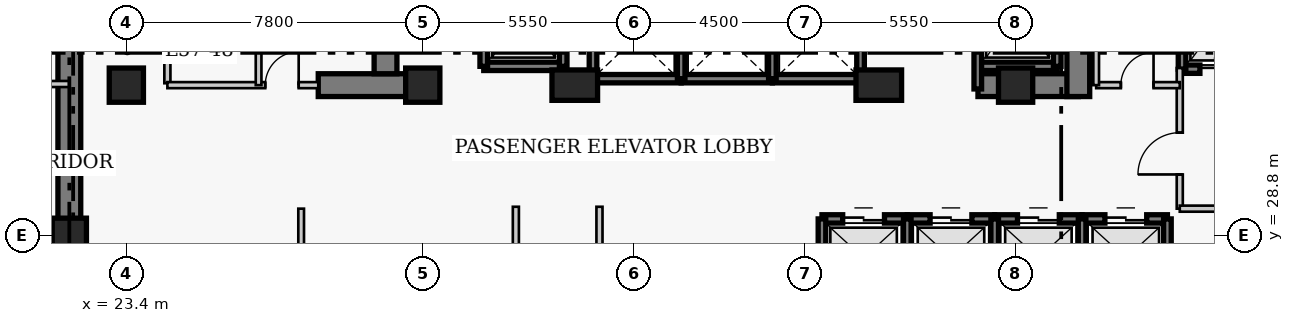
"""IFC4 building model, lengths in metres.
Left out: names, types, materials, properties, quantities, classifications, styles, units other than length and angle.
Written with IfcOpenShell. Run it as: python <this file> out.ifc"""

import sys

from ifc_helpers import new_model, si_unit, direction, frame, frame_2d, origin, origin_2d, place, context, subcontext, project, spatial, rectangle, extrude, element, fill, save


model = new_model("IFC4")
c1 = context("Model", 3, precision=1e-05, world=origin(), true_north=direction((0.0, 1.0)))
c2 = subcontext(c1, "Body", "Model", "MODEL_VIEW")
j1 = project(units=[si_unit("LENGTHUNIT", "METRE"), si_unit("PLANEANGLEUNIT", "RADIAN")], contexts=[c1])
p1 = place(None, origin())
s1 = spatial("IfcSite", under=j1, at=p1, CompositionType="ELEMENT")
p2 = place(p1, origin())
s2 = spatial("IfcBuilding", under=s1, at=p2, CompositionType="ELEMENT")
p3 = place(p2, frame((0.0, 0.0, 228.0)))
s3 = spatial("IfcBuildingStorey", under=s2, at=p3, CompositionType="ELEMENT", Elevation=228.0)
p4 = place(p3, frame((21.9, 27.05, 0.0), z_axis=(0.0, 0.0, 1.0), x_axis=(0.0, 1.0, 0.0)))
e1 = element("IfcWall", 1, at=p4, inside=s3, PredefinedType="SHEAR", context=c2, shape_type="SweptSolid", body=[
    extrude(rectangle(XDim=13.57, YDim=0.6, at=frame_2d((6.785, 0.0))), origin(), (0.0, 0.0, 1.0), 3.9),
])
p5 = place(p3, frame((28.45, 32.75, 0.0), z_axis=(0.0, 0.0, 1.0), x_axis=(1.0, 0.0, 0.0)))
e2 = element("IfcWall", 2, at=p5, inside=s3, PredefinedType="SHEAR", context=c2, shape_type="SweptSolid", body=[
    extrude(rectangle(XDim=2.4, YDim=0.6, at=frame_2d((1.2, 0.0))), origin(), (0.0, 0.0, 1.0), 3.9),
])
p6 = place(p3, frame((45.81, 32.75, 0.0), z_axis=(0.0, 0.0, 1.0), x_axis=(1.0, 0.0, 0.0)))
e3 = element("IfcWall", 3, at=p6, inside=s3, PredefinedType="SHEAR", context=c2, shape_type="SweptSolid", body=[
    extrude(rectangle(XDim=2.64, YDim=0.6, at=frame_2d((1.32, 0.0))), origin(), (0.0, 0.0, 1.0), 3.9),
])
p7 = place(p3, frame((30.22, 33.05, 0.0), z_axis=(0.0, 0.0, 1.0), x_axis=(0.0, 1.0, 0.0)))
e4 = element("IfcWall", 4, at=p7, inside=s3, PredefinedType="SHEAR", context=c2, shape_type="SweptSolid", body=[
    extrude(rectangle(XDim=7.27, YDim=0.6, at=frame_2d((3.635, 0.0))), origin(), (0.0, 0.0, 1.0), 3.9),
])
p8 = place(p3, frame((48.45, 32.45, 0.0), z_axis=(0.0, 0.0, 1.0), x_axis=(0.0, 1.0, 0.0)))
e5 = element("IfcWall", 5, at=p8, inside=s3, PredefinedType="SHEAR", context=c2, shape_type="SweptSolid", body=[
    extrude(rectangle(XDim=7.87, YDim=0.6, at=frame_2d((3.935, 0.0))), origin(), (0.0, 0.0, 1.0), 3.9),
])
p9 = place(p8, frame((5.75, 0.0, 0.0)))
e6 = element("IfcOpeningElement", 6, at=p9, cuts=e5, PredefinedType="OPENING", context=c2, shape_type="SweptSolid", body=[
    extrude(rectangle(XDim=1.1, YDim=2.15, at=frame_2d((0.55, 1.075))), frame((0.0, 0.31, 0.0), z_axis=(0.0, -1.0, 0.0), x_axis=(1.0, 0.0, 0.0)), (0.0, 0.0, 1.0), 0.62),
])
for number, where, z_axis, x_axis in (
    (7, (21.9, 28.8, 0.0), (0.0, 0.0, 1.0), (1.0, 0.0, 0.0)),
    (8, (23.4, 32.75, 0.0), (0.0, 0.0, 1.0), (1.0, 0.0, 0.0)),
    (9, (31.2, 32.75, 0.0), (0.0, 0.0, 1.0), (1.0, 0.0, 0.0)),
):
    element("IfcColumn", number, at=place(p3, frame(where, z_axis=z_axis, x_axis=x_axis)), inside=s3, PredefinedType="COLUMN", context=c2, shape_type="SweptSolid", body=[
        extrude(rectangle(XDim=0.9, YDim=0.9, at=origin_2d()), origin(), (0.0, 0.0, 1.0), 3.9),
    ])
for number, where, z_axis, x_axis in (
    (10, (35.2, 32.75, 0.0), (0.0, 0.0, 1.0), (1.0, 0.0, 0.0)),
    (11, (43.2, 32.75, 0.0), (0.0, 0.0, 1.0), (1.0, 0.0, 0.0)),
):
    element("IfcColumn", number, at=place(p3, frame(where, z_axis=z_axis, x_axis=x_axis)), inside=s3, PredefinedType="COLUMN", context=c2, shape_type="SweptSolid", body=[
        extrude(rectangle(XDim=1.2, YDim=0.8, at=origin_2d()), origin(), (0.0, 0.0, 1.0), 3.9),
    ])
p10 = place(p3, frame((46.8, 32.75, 0.0), z_axis=(0.0, 0.0, 1.0), x_axis=(1.0, 0.0, 0.0)))
e12 = element("IfcColumn", 12, at=p10, inside=s3, PredefinedType="COLUMN", context=c2, shape_type="SweptSolid", body=[
    extrude(rectangle(XDim=0.9, YDim=0.9, at=origin_2d()), origin(), (0.0, 0.0, 1.0), 3.9),
])
p11 = place(p3, frame((41.705, 29.23, 0.0), z_axis=(0.0, 0.0, 1.0), x_axis=(1.0, 0.0, 0.0)))
e13 = element("IfcWall", 13, at=p11, inside=s3, PredefinedType="SHEAR", context=c2, shape_type="SweptSolid", body=[
    extrude(rectangle(XDim=2.245, YDim=0.22, at=frame_2d((1.123, 0.0))), origin(), (0.0, 0.0, 1.0), 3.9),
])
p12 = place(p11, frame((0.545, 0.0, 0.0)))
e14 = element("IfcOpeningElement", 14, at=p12, cuts=e13, PredefinedType="OPENING", context=c2, shape_type="SweptSolid", body=[
    extrude(rectangle(XDim=1.1, YDim=2.15, at=frame_2d((0.55, 1.075))), frame((0.0, 0.12, 0.0), z_axis=(0.0, -1.0, 0.0), x_axis=(1.0, 0.0, 0.0)), (0.0, 0.0, 1.0), 0.24),
])
p13 = place(p3, frame((41.705, 27.17, 0.0), z_axis=(0.0, 0.0, 1.0), x_axis=(0.0, 1.0, 0.0)))
e15 = element("IfcWall", 15, at=p13, inside=s3, PredefinedType="SHEAR", context=c2, shape_type="SweptSolid", body=[
    extrude(rectangle(XDim=2.06, YDim=0.2, at=frame_2d((1.03, 0.0))), origin(), (0.0, 0.0, 1.0), 3.9),
])
p14 = place(p3, frame((43.95, 29.23, 0.0), z_axis=(0.0, 0.0, 1.0), x_axis=(1.0, 0.0, 0.0)))
e16 = element("IfcWall", 16, at=p14, inside=s3, PredefinedType="SHEAR", context=c2, shape_type="SweptSolid", body=[
    extrude(rectangle(XDim=2.3, YDim=0.22, at=frame_2d((1.15, 0.0))), origin(), (0.0, 0.0, 1.0), 3.9),
])
p15 = place(p14, frame((0.6, 0.0, 0.0)))
e17 = element("IfcOpeningElement", 17, at=p15, cuts=e16, PredefinedType="OPENING", context=c2, shape_type="SweptSolid", body=[
    extrude(rectangle(XDim=1.1, YDim=2.15, at=frame_2d((0.55, 1.075))), frame((0.0, 0.12, 0.0), z_axis=(0.0, -1.0, 0.0), x_axis=(1.0, 0.0, 0.0)), (0.0, 0.0, 1.0), 0.24),
])
p16 = place(p3, frame((43.95, 27.17, 0.0), z_axis=(0.0, 0.0, 1.0), x_axis=(0.0, 1.0, 0.0)))
e18 = element("IfcWall", 18, at=p16, inside=s3, PredefinedType="SHEAR", context=c2, shape_type="SweptSolid", body=[
    extrude(rectangle(XDim=2.06, YDim=0.2, at=frame_2d((1.03, 0.0))), origin(), (0.0, 0.0, 1.0), 3.9),
])
p17 = place(p3, frame((46.25, 29.23, 0.0), z_axis=(0.0, 0.0, 1.0), x_axis=(1.0, 0.0, 0.0)))
e19 = element("IfcWall", 19, at=p17, inside=s3, PredefinedType="SHEAR", context=c2, shape_type="SweptSolid", body=[
    extrude(rectangle(XDim=2.3, YDim=0.22, at=frame_2d((1.15, 0.0))), origin(), (0.0, 0.0, 1.0), 3.9),
])
p18 = place(p17, frame((0.6, 0.0, 0.0)))
e20 = element("IfcOpeningElement", 20, at=p18, cuts=e19, PredefinedType="OPENING", context=c2, shape_type="SweptSolid", body=[
    extrude(rectangle(XDim=1.1, YDim=2.15, at=frame_2d((0.55, 1.075))), frame((0.0, 0.12, 0.0), z_axis=(0.0, -1.0, 0.0), x_axis=(1.0, 0.0, 0.0)), (0.0, 0.0, 1.0), 0.24),
])
p19 = place(p3, frame((46.25, 27.17, 0.0), z_axis=(0.0, 0.0, 1.0), x_axis=(0.0, 1.0, 0.0)))
e21 = element("IfcWall", 21, at=p19, inside=s3, PredefinedType="SHEAR", context=c2, shape_type="SweptSolid", body=[
    extrude(rectangle(XDim=2.06, YDim=0.2, at=frame_2d((1.03, 0.0))), origin(), (0.0, 0.0, 1.0), 3.9),
])
p20 = place(p3, frame((48.55, 29.23, 0.0), z_axis=(0.0, 0.0, 1.0), x_axis=(1.0, 0.0, 0.0)))
e22 = element("IfcWall", 22, at=p20, inside=s3, PredefinedType="SHEAR", context=c2, shape_type="SweptSolid", body=[
    extrude(rectangle(XDim=2.245, YDim=0.22, at=frame_2d((1.123, 0.0))), origin(), (0.0, 0.0, 1.0), 3.9),
])
p21 = place(p20, frame((0.6, 0.0, 0.0)))
e23 = element("IfcOpeningElement", 23, at=p21, cuts=e22, PredefinedType="OPENING", context=c2, shape_type="SweptSolid", body=[
    extrude(rectangle(XDim=1.1, YDim=2.15, at=frame_2d((0.55, 1.075))), frame((0.0, 0.12, 0.0), z_axis=(0.0, -1.0, 0.0), x_axis=(1.0, 0.0, 0.0)), (0.0, 0.0, 1.0), 0.24),
])
for number, where, z_axis, x_axis in (
    (24, (48.55, 27.17, 0.0), (0.0, 0.0, 1.0), (0.0, 1.0, 0.0)),
    (25, (50.795, 27.17, 0.0), (0.0, 0.0, 1.0), (0.0, 1.0, 0.0)),
):
    element("IfcWall", number, at=place(p3, frame(where, z_axis=z_axis, x_axis=x_axis)), inside=s3, PredefinedType="SHEAR", context=c2, shape_type="SweptSolid", body=[
        extrude(rectangle(XDim=2.06, YDim=0.2, at=frame_2d((1.03, 0.0))), origin(), (0.0, 0.0, 1.0), 3.9),
    ])
p22 = place(p3, frame((35.68, 32.92, 0.0), z_axis=(0.0, 0.0, 1.0), x_axis=(1.0, 0.0, 0.0)))
e26 = element("IfcWall", 26, at=p22, inside=s3, PredefinedType="SHEAR", context=c2, shape_type="SweptSolid", body=[
    extrude(rectangle(XDim=2.32, YDim=0.22, at=frame_2d((1.16, 0.0))), origin(), (0.0, 0.0, 1.0), 3.9),
])
p23 = place(p3, frame((35.68, 32.92, 0.0), z_axis=(0.0, 0.0, 1.0), x_axis=(0.0, 1.0, 0.0)))
e27 = element("IfcWall", 27, at=p23, inside=s3, PredefinedType="SHEAR", context=c2, shape_type="SweptSolid", body=[
    extrude(rectangle(XDim=2.16, YDim=0.2, at=frame_2d((1.08, 0.0))), origin(), (0.0, 0.0, 1.0), 3.9),
])
p24 = place(p3, frame((38.0, 32.92, 0.0), z_axis=(0.0, 0.0, 1.0), x_axis=(1.0, 0.0, 0.0)))
e28 = element("IfcWall", 28, at=p24, inside=s3, PredefinedType="SHEAR", context=c2, shape_type="SweptSolid", body=[
    extrude(rectangle(XDim=2.4, YDim=0.22, at=frame_2d((1.2, 0.0))), origin(), (0.0, 0.0, 1.0), 3.9),
])
p25 = place(p3, frame((38.0, 32.92, 0.0), z_axis=(0.0, 0.0, 1.0), x_axis=(0.0, 1.0, 0.0)))
e29 = element("IfcWall", 29, at=p25, inside=s3, PredefinedType="SHEAR", context=c2, shape_type="SweptSolid", body=[
    extrude(rectangle(XDim=2.16, YDim=0.2, at=frame_2d((1.08, 0.0))), origin(), (0.0, 0.0, 1.0), 3.9),
])
p26 = place(p3, frame((40.4, 32.92, 0.0), z_axis=(0.0, 0.0, 1.0), x_axis=(1.0, 0.0, 0.0)))
e30 = element("IfcWall", 30, at=p26, inside=s3, PredefinedType="SHEAR", context=c2, shape_type="SweptSolid", body=[
    extrude(rectangle(XDim=2.32, YDim=0.22, at=frame_2d((1.16, 0.0))), origin(), (0.0, 0.0, 1.0), 3.9),
])
for number, where, z_axis, x_axis in (
    (31, (40.4, 32.92, 0.0), (0.0, 0.0, 1.0), (0.0, 1.0, 0.0)),
    (32, (42.72, 32.92, 0.0), (0.0, 0.0, 1.0), (0.0, 1.0, 0.0)),
):
    element("IfcWall", number, at=place(p3, frame(where, z_axis=z_axis, x_axis=x_axis)), inside=s3, PredefinedType="SHEAR", context=c2, shape_type="SweptSolid", body=[
        extrude(rectangle(XDim=2.16, YDim=0.2, at=frame_2d((1.08, 0.0))), origin(), (0.0, 0.0, 1.0), 3.9),
    ])
p27 = place(p3, frame((51.18, 33.17, 0.0), z_axis=(0.0, 0.0, 1.0), x_axis=(1.0, 0.0, 0.0)))
e33 = element("IfcWall", 33, at=p27, inside=s3, PredefinedType="SHEAR", context=c2, shape_type="SweptSolid", body=[
    extrude(rectangle(XDim=2.42, YDim=0.22, at=frame_2d((1.21, 0.0))), origin(), (0.0, 0.0, 1.0), 3.9),
])
p28 = place(p27, frame((0.47, 0.0, 0.0)))
e34 = element("IfcOpeningElement", 34, at=p28, cuts=e33, PredefinedType="OPENING", context=c2, shape_type="SweptSolid", body=[
    extrude(rectangle(XDim=1.3, YDim=2.15, at=frame_2d((0.65, 1.075))), frame((0.0, 0.12, 0.0), z_axis=(0.0, -1.0, 0.0), x_axis=(1.0, 0.0, 0.0)), (0.0, 0.0, 1.0), 0.24),
])
p29 = place(p3, frame((51.18, 33.17, 0.0), z_axis=(0.0, 0.0, 1.0), x_axis=(0.0, 1.0, 0.0)))
e35 = element("IfcWall", 35, at=p29, inside=s3, PredefinedType="SHEAR", context=c2, shape_type="SweptSolid", body=[
    extrude(rectangle(XDim=2.86, YDim=0.2, at=frame_2d((1.43, 0.0))), origin(), (0.0, 0.0, 1.0), 3.9),
])
p30 = place(p3, frame((32.805, 33.245, 0.0), z_axis=(0.0, 0.0, 1.0), x_axis=(1.0, 0.0, 0.0)))
e36 = element("IfcWall", 36, at=p30, inside=s3, PredefinedType="SHEAR", context=c2, shape_type="SweptSolid", body=[
    extrude(rectangle(XDim=2.09, YDim=0.22, at=frame_2d((1.045, 0.0))), origin(), (0.0, 0.0, 1.0), 3.9),
])
for number, where, z_axis, x_axis in (
    (37, (32.805, 33.245, 0.0), (0.0, 0.0, 1.0), (0.0, 1.0, 0.0)),
    (38, (34.895, 33.245, 0.0), (0.0, 0.0, 1.0), (0.0, 1.0, 0.0)),
):
    element("IfcWall", number, at=place(p3, frame(where, z_axis=z_axis, x_axis=x_axis)), inside=s3, PredefinedType="SHEAR", context=c2, shape_type="SweptSolid", body=[
        extrude(rectangle(XDim=2.91, YDim=0.2, at=frame_2d((1.455, 0.0))), origin(), (0.0, 0.0, 1.0), 3.9),
    ])
p31 = place(p3, frame((45.805, 33.245, 0.0), z_axis=(0.0, 0.0, 1.0), x_axis=(1.0, 0.0, 0.0)))
e39 = element("IfcWall", 39, at=p31, inside=s3, PredefinedType="SHEAR", context=c2, shape_type="SweptSolid", body=[
    extrude(rectangle(XDim=2.09, YDim=0.22, at=frame_2d((1.045, 0.0))), origin(), (0.0, 0.0, 1.0), 3.9),
])
p32 = place(p3, frame((45.805, 32.65, 0.0), z_axis=(0.0, 0.0, 1.0), x_axis=(0.0, 1.0, 0.0)))
e40 = element("IfcWall", 40, at=p32, inside=s3, PredefinedType="SHEAR", context=c2, shape_type="SweptSolid", body=[
    extrude(rectangle(XDim=3.505, YDim=0.2, at=frame_2d((1.752, 0.0))), origin(), (0.0, 0.0, 1.0), 3.9),
])
p33 = place(p3, frame((47.895, 33.245, 0.0), z_axis=(0.0, 0.0, 1.0), x_axis=(0.0, 1.0, 0.0)))
e41 = element("IfcWall", 41, at=p33, inside=s3, PredefinedType="SHEAR", context=c2, shape_type="SweptSolid", body=[
    extrude(rectangle(XDim=2.91, YDim=0.2, at=frame_2d((1.455, 0.0))), origin(), (0.0, 0.0, 1.0), 3.9),
])
p34 = place(p3, frame((24.48, 32.8, 0.0), z_axis=(0.0, 0.0, 1.0), x_axis=(0.0, 1.0, 0.0)))
e42 = element("IfcWall", 42, at=p34, inside=s3, PredefinedType="PARTITIONING", context=c2, shape_type="SweptSolid", body=[
    extrude(rectangle(XDim=3.57, YDim=0.16, at=frame_2d((1.785, 0.0))), origin(), (0.0, 0.0, 1.0), 3.56),
])
p35 = place(p34, frame((1.604, 0.0, 0.0)))
e43 = element("IfcOpeningElement", 43, at=p35, cuts=e42, PredefinedType="OPENING", context=c2, shape_type="SweptSolid", body=[
    extrude(rectangle(XDim=0.9, YDim=2.1, at=frame_2d((0.45, 1.05))), frame((0.0, 0.09, 0.0), z_axis=(0.0, -1.0, 0.0), x_axis=(1.0, 0.0, 0.0)), (0.0, 0.0, 1.0), 0.18),
])
p36 = place(p3, frame((51.12, 29.5, 0.0), z_axis=(0.0, 0.0, 1.0), x_axis=(0.0, 1.0, 0.0)))
e44 = element("IfcWall", 44, at=p36, inside=s3, PredefinedType="PARTITIONING", context=c2, shape_type="SweptSolid", body=[
    extrude(rectangle(XDim=3.7, YDim=0.16, at=frame_2d((1.85, 0.0))), origin(), (0.0, 0.0, 1.0), 3.56),
])
p37 = place(p36, frame((0.9, 0.0, 0.0)))
e45 = element("IfcOpeningElement", 45, at=p37, cuts=e44, PredefinedType="OPENING", context=c2, shape_type="SweptSolid", body=[
    extrude(rectangle(XDim=1.1, YDim=2.15, at=frame_2d((0.55, 1.075))), frame((0.0, 0.09, 0.0), z_axis=(0.0, -1.0, 0.0), x_axis=(1.0, 0.0, 0.0)), (0.0, 0.0, 1.0), 0.18),
])
p38 = place(p3, frame((51.12, 29.5, 0.0), z_axis=(0.0, 0.0, 1.0), x_axis=(1.0, 0.0, 0.0)))
e46 = element("IfcWall", 46, at=p38, inside=s3, PredefinedType="PARTITIONING", context=c2, shape_type="SweptSolid", body=[
    extrude(rectangle(XDim=5.63, YDim=0.16, at=frame_2d((2.815, 0.0))), origin(), (0.0, 0.0, 1.0), 3.56),
])
p39 = place(p3, frame((24.48, 32.75, 0.0), z_axis=(0.0, 0.0, 1.0), x_axis=(1.0, 0.0, 0.0)))
e47 = element("IfcWall", 47, at=p39, inside=s3, PredefinedType="PARTITIONING", context=c2, shape_type="SweptSolid", body=[
    extrude(rectangle(XDim=3.97, YDim=0.16, at=frame_2d((1.985, 0.0))), origin(), (0.0, 0.0, 1.0), 3.56),
])
p40 = place(p39, frame((2.575, 0.0, 0.0)))
e48 = element("IfcOpeningElement", 48, at=p40, cuts=e47, PredefinedType="OPENING", context=c2, shape_type="SweptSolid", body=[
    extrude(rectangle(XDim=0.88, YDim=2.05, at=frame_2d((0.44, 1.025))), frame((0.0, 0.09, 0.0), z_axis=(0.0, -1.0, 0.0), x_axis=(1.0, 0.0, 0.0)), (0.0, 0.0, 1.0), 0.18),
])
p41 = place(p3, frame((48.92, 32.75, 0.0), z_axis=(0.0, 0.0, 1.0), x_axis=(1.0, 0.0, 0.0)))
e49 = element("IfcWall", 49, at=p41, inside=s3, PredefinedType="PARTITIONING", context=c2, shape_type="SweptSolid", body=[
    extrude(rectangle(XDim=2.2, YDim=0.16, at=frame_2d((1.1, 0.0))), origin(), (0.0, 0.0, 1.0), 3.56),
])
p42 = place(p41, frame((0.65, 0.0, 0.0)))
e50 = element("IfcOpeningElement", 50, at=p42, cuts=e49, PredefinedType="OPENING", context=c2, shape_type="SweptSolid", body=[
    extrude(rectangle(XDim=0.86, YDim=2.05, at=frame_2d((0.43, 1.025))), frame((0.0, 0.09, 0.0), z_axis=(0.0, -1.0, 0.0), x_axis=(1.0, 0.0, 0.0)), (0.0, 0.0, 1.0), 0.18),
])
for number, where, z_axis, x_axis in (
    (51, (48.92, 32.75, 0.0), (0.0, 0.0, 1.0), (0.0, 1.0, 0.0)),
    (52, (26.88, 32.75, 0.0), (0.0, 0.0, 1.0), (0.0, 1.0, 0.0)),
):
    element("IfcWall", number, at=place(p3, frame(where, z_axis=z_axis, x_axis=x_axis)), inside=s3, PredefinedType="PARTITIONING", context=c2, shape_type="SweptSolid", body=[
        extrude(rectangle(XDim=3.62, YDim=0.15, at=frame_2d((1.81, 0.0))), origin(), (0.0, 0.0, 1.0), 3.56),
    ])
for number, where, z_axis, x_axis in (
    (53, (33.65, 17.66, 0.0), (0.0, 0.0, 1.0), (0.0, 1.0, 0.0)),
    (54, (35.85, 17.66, 0.0), (0.0, 0.0, 1.0), (0.0, 1.0, 0.0)),
):
    element("IfcWall", number, at=place(p3, frame(where, z_axis=z_axis, x_axis=x_axis)), inside=s3, PredefinedType="PARTITIONING", context=c2, shape_type="SweptSolid", body=[
        extrude(rectangle(XDim=11.89, YDim=0.16, at=frame_2d((5.945, 0.0))), origin(), (0.0, 0.0, 1.0), 3.56),
    ])
p43 = place(p3, frame((19.96, 32.78, 0.0), z_axis=(0.0, 0.0, 1.0), x_axis=(1.0, 0.0, 0.0)))
e55 = element("IfcWall", 55, at=p43, inside=s3, PredefinedType="PARTITIONING", context=c2, shape_type="SweptSolid", body=[
    extrude(rectangle(XDim=1.94, YDim=0.16, at=frame_2d((0.97, 0.0))), origin(), (0.0, 0.0, 1.0), 3.56),
])
p44 = place(p3, frame((28.0, 17.66, 0.0), z_axis=(0.0, 0.0, 1.0), x_axis=(0.0, 1.0, 0.0)))
e56 = element("IfcWall", 56, at=p44, inside=s3, PredefinedType="PARTITIONING", context=c2, shape_type="SweptSolid", body=[
    extrude(rectangle(XDim=11.84, YDim=0.15, at=frame_2d((5.92, 0.0))), origin(), (0.0, 0.0, 1.0), 3.56),
])
p45 = place(p12, origin())
e57 = element("IfcDoor", 57, at=p45, inside=s3, OperationType="DOUBLE_DOOR_SLIDING", PredefinedType="DOOR", context=c2, shape_type="SweptSolid", body=[
    extrude(rectangle(XDim=1.1, YDim=2.15, at=frame_2d((0.55, 1.075))), frame((0.0, 0.025, 0.0), z_axis=(0.0, -1.0, 0.0), x_axis=(1.0, 0.0, 0.0)), (0.0, 0.0, 1.0), 0.05),
])
fill(e14, e57)
p46 = place(p15, origin())
e58 = element("IfcDoor", 58, at=p46, inside=s3, OperationType="DOUBLE_DOOR_SLIDING", PredefinedType="DOOR", context=c2, shape_type="SweptSolid", body=[
    extrude(rectangle(XDim=1.1, YDim=2.15, at=frame_2d((0.55, 1.075))), frame((0.0, 0.025, 0.0), z_axis=(0.0, -1.0, 0.0), x_axis=(1.0, 0.0, 0.0)), (0.0, 0.0, 1.0), 0.05),
])
fill(e17, e58)
p47 = place(p18, origin())
e59 = element("IfcDoor", 59, at=p47, inside=s3, OperationType="DOUBLE_DOOR_SLIDING", PredefinedType="DOOR", context=c2, shape_type="SweptSolid", body=[
    extrude(rectangle(XDim=1.1, YDim=2.15, at=frame_2d((0.55, 1.075))), frame((0.0, 0.025, 0.0), z_axis=(0.0, -1.0, 0.0), x_axis=(1.0, 0.0, 0.0)), (0.0, 0.0, 1.0), 0.05),
])
fill(e20, e59)
p48 = place(p21, origin())
e60 = element("IfcDoor", 60, at=p48, inside=s3, OperationType="DOUBLE_DOOR_SLIDING", PredefinedType="DOOR", context=c2, shape_type="SweptSolid", body=[
    extrude(rectangle(XDim=1.1, YDim=2.15, at=frame_2d((0.55, 1.075))), frame((0.0, 0.025, 0.0), z_axis=(0.0, -1.0, 0.0), x_axis=(1.0, 0.0, 0.0)), (0.0, 0.0, 1.0), 0.05),
])
fill(e23, e60)
p49 = place(p28, origin())
e61 = element("IfcDoor", 61, at=p49, inside=s3, OperationType="DOUBLE_DOOR_SLIDING", PredefinedType="DOOR", context=c2, shape_type="SweptSolid", body=[
    extrude(rectangle(XDim=1.3, YDim=2.15, at=frame_2d((0.65, 1.075))), frame((0.0, 0.025, 0.0), z_axis=(0.0, -1.0, 0.0), x_axis=(1.0, 0.0, 0.0)), (0.0, 0.0, 1.0), 0.05),
])
fill(e34, e61)
p50 = place(p37, origin())
e62 = element("IfcDoor", 62, at=p50, inside=s3, OperationType="SINGLE_SWING_LEFT", PredefinedType="DOOR", context=c2, shape_type="SweptSolid", body=[
    extrude(rectangle(XDim=1.1, YDim=2.15, at=frame_2d((0.55, 1.075))), frame((0.0, 0.025, 0.0), z_axis=(0.0, -1.0, 0.0), x_axis=(1.0, 0.0, 0.0)), (0.0, 0.0, 1.0), 0.05),
])
fill(e45, e62)
p51 = place(p40, origin())
e63 = element("IfcDoor", 63, at=p51, inside=s3, OperationType="SINGLE_SWING_RIGHT", PredefinedType="DOOR", context=c2, shape_type="SweptSolid", body=[
    extrude(rectangle(XDim=0.88, YDim=2.05, at=frame_2d((0.44, 1.025))), frame((0.0, 0.025, 0.0), z_axis=(0.0, -1.0, 0.0), x_axis=(1.0, 0.0, 0.0)), (0.0, 0.0, 1.0), 0.05),
])
fill(e48, e63)
p52 = place(p42, origin())
e64 = element("IfcDoor", 64, at=p52, inside=s3, OperationType="SINGLE_SWING_RIGHT", PredefinedType="DOOR", context=c2, shape_type="SweptSolid", body=[
    extrude(rectangle(XDim=0.86, YDim=2.05, at=frame_2d((0.43, 1.025))), frame((0.0, 0.025, 0.0), z_axis=(0.0, -1.0, 0.0), x_axis=(1.0, 0.0, 0.0)), (0.0, 0.0, 1.0), 0.05),
])
fill(e50, e64)
save(model, sys.argv[1])
